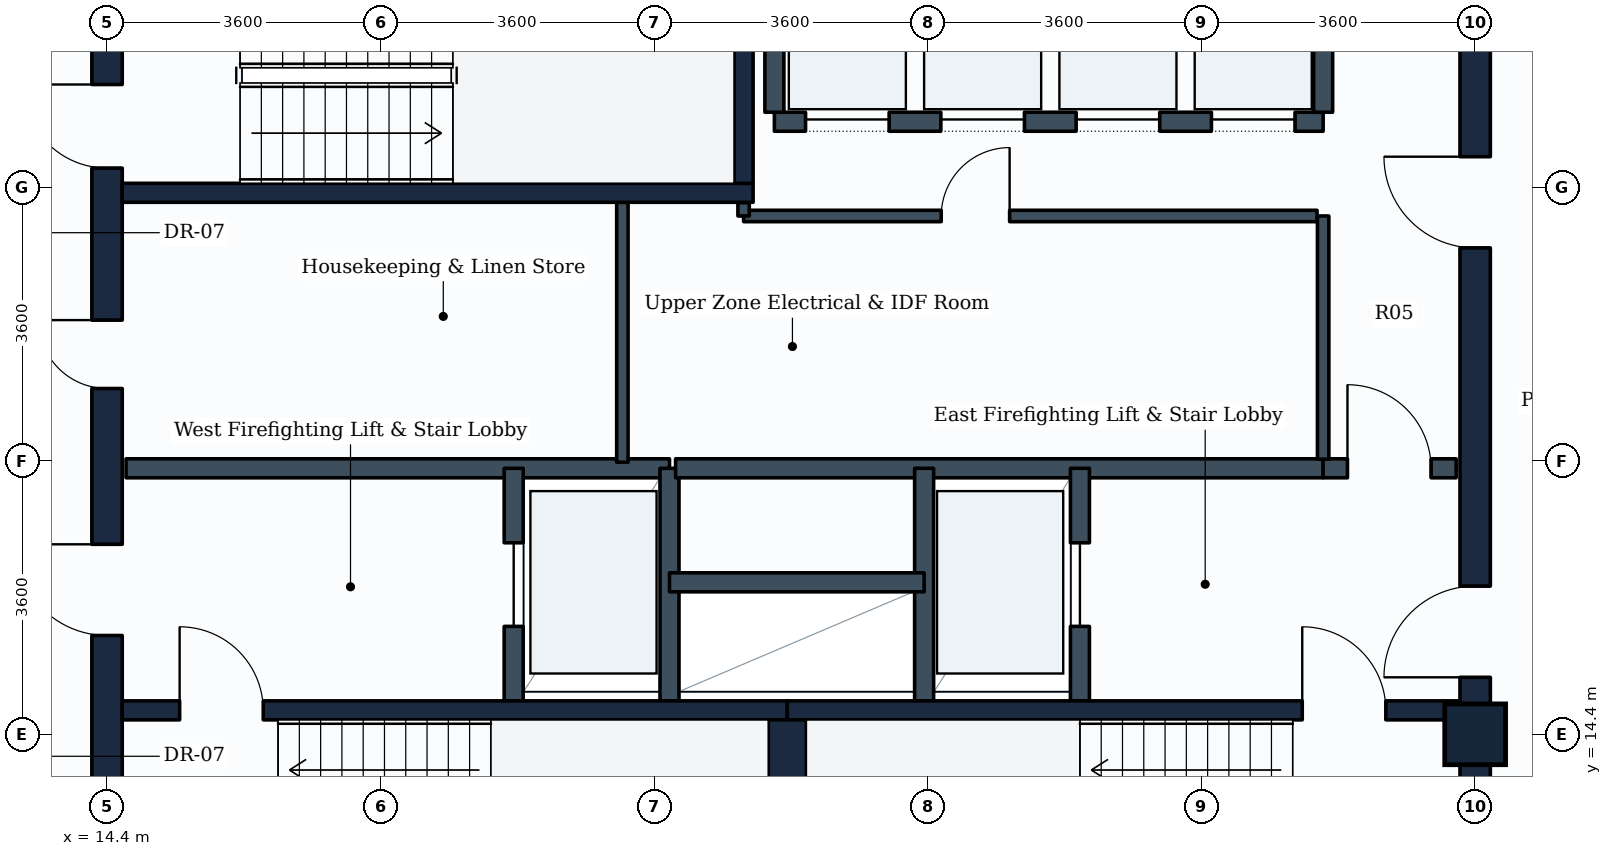
"""IFC4 building model, lengths in metres.
Left out: names, types, materials, properties, quantities, classifications, styles, units other than length and angle.
Written with IfcOpenShell. Run it as: python <this file> out.ifc"""

import sys

from ifc_helpers import new_model, si_unit, direction, frame, frame_2d, origin, origin_2d, place, context, subcontext, project, spatial, rectangle, extrude, element, fill, save


model = new_model("IFC4")
c1 = context("Model", 3, precision=1e-05, world=origin(), true_north=direction((0.0, 1.0)))
c2 = subcontext(c1, "Body", "Model", "MODEL_VIEW")
j1 = project(units=[si_unit("LENGTHUNIT", "METRE"), si_unit("PLANEANGLEUNIT", "RADIAN")], contexts=[c1])
p1 = place(None, origin())
s1 = spatial("IfcSite", under=j1, at=p1, CompositionType="ELEMENT")
p2 = place(p1, origin())
s2 = spatial("IfcBuilding", under=s1, at=p2, CompositionType="ELEMENT")
p3 = place(p2, frame((0.0, 0.0, 224.6)))
s3 = spatial("IfcBuildingStorey", under=s2, at=p3, CompositionType="ELEMENT", Elevation=224.6)
p4 = place(p3, frame((32.4, 14.4, 0.0), z_axis=(0.0, 0.0, 1.0), x_axis=(1.0, 0.0, 0.0)))
e1 = element("IfcColumn", 1, at=p4, inside=s3, PredefinedType="COLUMN", context=c2, shape_type="SweptSolid", body=[
    extrude(rectangle(XDim=0.8, YDim=0.8, at=origin_2d()), origin(), (0.0, 0.0, 1.0), 3.6),
])
p5 = place(p3, frame((14.4, 10.8, 0.0), z_axis=(0.0, 0.0, 1.0), x_axis=(0.0, 1.0, 0.0)))
e2 = element("IfcWall", 2, at=p5, inside=s3, PredefinedType="SHEAR", context=c2, shape_type="SweptSolid", body=[
    extrude(rectangle(XDim=14.4, YDim=0.4, at=frame_2d((7.2, 0.0))), origin(), (0.0, 0.0, 1.0), 3.35),
])
p6 = place(p5, frame((11.05, 0.0, 0.0)))
e3 = element("IfcOpeningElement", 3, at=p6, cuts=e2, PredefinedType="OPENING", context=c2, shape_type="SweptSolid", body=[
    extrude(rectangle(XDim=1.1, YDim=2.1, at=frame_2d((0.55, 1.05))), frame((0.0, 0.21, 0.0), z_axis=(0.0, -1.0, 0.0), x_axis=(1.0, 0.0, 0.0)), (0.0, 0.0, 1.0), 0.42),
])
p7 = place(p5, frame((4.9, 0.0, 0.0)))
e4 = element("IfcOpeningElement", 4, at=p7, cuts=e2, PredefinedType="OPENING", context=c2, shape_type="SweptSolid", body=[
    extrude(rectangle(XDim=1.2, YDim=2.1, at=frame_2d((0.6, 1.05))), frame((0.0, 0.21, 0.0), z_axis=(0.0, -1.0, 0.0), x_axis=(1.0, 0.0, 0.0)), (0.0, 0.0, 1.0), 0.42),
])
p8 = place(p5, frame((8.15, 0.0, 0.0)))
e5 = element("IfcOpeningElement", 5, at=p8, cuts=e2, PredefinedType="OPENING", context=c2, shape_type="SweptSolid", body=[
    extrude(rectangle(XDim=0.9, YDim=2.1, at=frame_2d((0.45, 1.05))), frame((0.0, 0.21, 0.0), z_axis=(0.0, -1.0, 0.0), x_axis=(1.0, 0.0, 0.0)), (0.0, 0.0, 1.0), 0.42),
])
p9 = place(p3, frame((32.4, 10.8, 0.0), z_axis=(0.0, 0.0, 1.0), x_axis=(0.0, 1.0, 0.0)))
e6 = element("IfcWall", 6, at=p9, inside=s3, PredefinedType="SHEAR", context=c2, shape_type="SweptSolid", body=[
    extrude(rectangle(XDim=14.4, YDim=0.4, at=frame_2d((7.2, 0.0))), origin(), (0.0, 0.0, 1.0), 3.35),
])
p10 = place(p9, frame((4.35, 0.0, 0.0)))
e7 = element("IfcOpeningElement", 7, at=p10, cuts=e6, PredefinedType="OPENING", context=c2, shape_type="SweptSolid", body=[
    extrude(rectangle(XDim=1.2, YDim=2.1, at=frame_2d((0.6, 1.05))), frame((0.0, 0.21, 0.0), z_axis=(0.0, -1.0, 0.0), x_axis=(1.0, 0.0, 0.0)), (0.0, 0.0, 1.0), 0.42),
])
p11 = place(p9, frame((10.0, 0.0, 0.0)))
e8 = element("IfcOpeningElement", 8, at=p11, cuts=e6, PredefinedType="OPENING", context=c2, shape_type="SweptSolid", body=[
    extrude(rectangle(XDim=1.2, YDim=2.1, at=frame_2d((0.6, 1.05))), frame((0.0, 0.21, 0.0), z_axis=(0.0, -1.0, 0.0), x_axis=(1.0, 0.0, 0.0)), (0.0, 0.0, 1.0), 0.42),
])
p12 = place(p3, frame((14.6, 14.715, 0.0), z_axis=(0.0, 0.0, 1.0), x_axis=(1.0, 0.0, 0.0)))
e9 = element("IfcWall", 9, at=p12, inside=s3, PredefinedType="SHEAR", context=c2, shape_type="SweptSolid", body=[
    extrude(rectangle(XDim=8.75, YDim=0.25, at=frame_2d((4.375, 0.0))), origin(), (0.0, 0.0, 1.0), 3.35),
])
p13 = place(p12, frame((0.755, 0.0, 0.0)))
e10 = element("IfcOpeningElement", 10, at=p13, cuts=e9, PredefinedType="OPENING", context=c2, shape_type="SweptSolid", body=[
    extrude(rectangle(XDim=1.1, YDim=2.1, at=frame_2d((0.55, 1.05))), frame((0.0, 0.135, 0.0), z_axis=(0.0, -1.0, 0.0), x_axis=(1.0, 0.0, 0.0)), (0.0, 0.0, 1.0), 0.27),
])
p14 = place(p3, frame((23.35, 14.715, 0.0), z_axis=(0.0, 0.0, 1.0), x_axis=(1.0, 0.0, 0.0)))
e11 = element("IfcWall", 11, at=p14, inside=s3, PredefinedType="SHEAR", context=c2, shape_type="SweptSolid", body=[
    extrude(rectangle(XDim=8.85, YDim=0.25, at=frame_2d((4.425, 0.0))), origin(), (0.0, 0.0, 1.0), 3.35),
])
p15 = place(p14, frame((6.775, 0.0, 0.0)))
e12 = element("IfcOpeningElement", 12, at=p15, cuts=e11, PredefinedType="OPENING", context=c2, shape_type="SweptSolid", body=[
    extrude(rectangle(XDim=1.1, YDim=2.1, at=frame_2d((0.55, 1.05))), frame((0.0, 0.135, 0.0), z_axis=(0.0, -1.0, 0.0), x_axis=(1.0, 0.0, 0.0)), (0.0, 0.0, 1.0), 0.27),
])
p16 = place(p3, frame((23.35, 11.75, 0.0), z_axis=(0.0, 0.0, 1.0), x_axis=(0.0, 1.0, 0.0)))
e13 = element("IfcWall", 13, at=p16, inside=s3, PredefinedType="SHEAR", context=c2, shape_type="SweptSolid", body=[
    extrude(rectangle(XDim=2.84, YDim=0.5, at=frame_2d((1.42, 0.0))), origin(), (0.0, 0.0, 1.0), 3.35),
])
p17 = place(p3, frame((14.6, 21.525, 0.0), z_axis=(0.0, 0.0, 1.0), x_axis=(1.0, 0.0, 0.0)))
e14 = element("IfcWall", 14, at=p17, inside=s3, PredefinedType="SHEAR", context=c2, shape_type="SweptSolid", body=[
    extrude(rectangle(XDim=8.3, YDim=0.25, at=frame_2d((4.15, 0.0))), origin(), (0.0, 0.0, 1.0), 3.35),
])
p18 = place(p3, frame((22.775, 21.65, 0.0), z_axis=(0.0, 0.0, 1.0), x_axis=(0.0, 1.0, 0.0)))
e15 = element("IfcWall", 15, at=p18, inside=s3, PredefinedType="SHEAR", context=c2, shape_type="SweptSolid", body=[
    extrude(rectangle(XDim=2.84, YDim=0.25, at=frame_2d((1.42, 0.0))), origin(), (0.0, 0.0, 1.0), 3.35),
])
p19 = place(p3, frame((14.65, 17.9, 0.0), z_axis=(0.0, 0.0, 1.0), x_axis=(1.0, 0.0, 0.0)))
e16 = element("IfcWall", 16, at=p19, inside=s3, PredefinedType="PARTITIONING", context=c2, shape_type="SweptSolid", body=[
    extrude(rectangle(XDim=7.15, YDim=0.25, at=frame_2d((3.575, 0.0))), origin(), (0.0, 0.0, 1.0), 3.335),
])
p20 = place(p3, frame((19.75, 14.84, 0.0), z_axis=(0.0, 0.0, 1.0), x_axis=(0.0, 1.0, 0.0)))
e17 = element("IfcWall", 17, at=p20, inside=s3, PredefinedType="PARTITIONING", context=c2, shape_type="SweptSolid", body=[
    extrude(rectangle(XDim=3.06, YDim=0.25, at=frame_2d((1.53, 0.0))), origin(), (0.0, 0.0, 1.0), 3.335),
])
p21 = place(p20, frame((0.98, 0.0, 0.0)))
e18 = element("IfcOpeningElement", 18, at=p21, cuts=e17, PredefinedType="OPENING", context=c2, shape_type="SweptSolid", body=[
    extrude(rectangle(XDim=1.1, YDim=2.1, at=frame_2d((0.55, 1.05))), frame((0.0, 0.135, 0.0), z_axis=(0.0, -1.0, 0.0), x_axis=(1.0, 0.0, 0.0)), (0.0, 0.0, 1.0), 0.27),
])
p22 = place(p3, frame((21.8, 14.84, 0.0), z_axis=(0.0, 0.0, 1.0), x_axis=(0.0, 1.0, 0.0)))
e19 = element("IfcWall", 19, at=p22, inside=s3, PredefinedType="PARTITIONING", context=c2, shape_type="SweptSolid", body=[
    extrude(rectangle(XDim=3.06, YDim=0.25, at=frame_2d((1.53, 0.0))), origin(), (0.0, 0.0, 1.0), 3.335),
])
p23 = place(p3, frame((21.88, 17.9, 0.0), z_axis=(0.0, 0.0, 1.0), x_axis=(1.0, 0.0, 0.0)))
e20 = element("IfcWall", 20, at=p23, inside=s3, PredefinedType="PARTITIONING", context=c2, shape_type="SweptSolid", body=[
    extrude(rectangle(XDim=8.52, YDim=0.25, at=frame_2d((4.26, 0.0))), origin(), (0.0, 0.0, 1.0), 3.335),
])
p24 = place(p3, frame((30.4, 17.9, 0.0), z_axis=(0.0, 0.0, 1.0), x_axis=(1.0, 0.0, 0.0)))
e21 = element("IfcWall", 21, at=p24, inside=s3, PredefinedType="PARTITIONING", context=c2, shape_type="SweptSolid", body=[
    extrude(rectangle(XDim=1.75, YDim=0.25, at=frame_2d((0.875, 0.0))), origin(), (0.0, 0.0, 1.0), 3.335),
])
p25 = place(p24, frame((0.32, 0.0, 0.0)))
e22 = element("IfcOpeningElement", 22, at=p25, cuts=e21, PredefinedType="OPENING", context=c2, shape_type="SweptSolid", body=[
    extrude(rectangle(XDim=1.1, YDim=2.1, at=frame_2d((0.55, 1.05))), frame((0.0, 0.135, 0.0), z_axis=(0.0, -1.0, 0.0), x_axis=(1.0, 0.0, 0.0)), (0.0, 0.0, 1.0), 0.27),
])
p26 = place(p3, frame((25.15, 14.84, 0.0), z_axis=(0.0, 0.0, 1.0), x_axis=(0.0, 1.0, 0.0)))
e23 = element("IfcWall", 23, at=p26, inside=s3, PredefinedType="PARTITIONING", context=c2, shape_type="SweptSolid", body=[
    extrude(rectangle(XDim=3.06, YDim=0.25, at=frame_2d((1.53, 0.0))), origin(), (0.0, 0.0, 1.0), 3.335),
])
p27 = place(p3, frame((27.2, 14.84, 0.0), z_axis=(0.0, 0.0, 1.0), x_axis=(0.0, 1.0, 0.0)))
e24 = element("IfcWall", 24, at=p27, inside=s3, PredefinedType="PARTITIONING", context=c2, shape_type="SweptSolid", body=[
    extrude(rectangle(XDim=3.06, YDim=0.25, at=frame_2d((1.53, 0.0))), origin(), (0.0, 0.0, 1.0), 3.335),
])
p28 = place(p27, frame((0.98, 0.0, 0.0)))
e25 = element("IfcOpeningElement", 25, at=p28, cuts=e24, PredefinedType="OPENING", context=c2, shape_type="SweptSolid", body=[
    extrude(rectangle(XDim=1.1, YDim=2.1, at=frame_2d((0.55, 1.05))), frame((0.0, 0.135, 0.0), z_axis=(0.0, -1.0, 0.0), x_axis=(1.0, 0.0, 0.0)), (0.0, 0.0, 1.0), 0.27),
])
p29 = place(p3, frame((21.8, 16.4, 0.0), z_axis=(0.0, 0.0, 1.0), x_axis=(1.0, 0.0, 0.0)))
e26 = element("IfcWall", 26, at=p29, inside=s3, PredefinedType="PARTITIONING", context=c2, shape_type="SweptSolid", body=[
    extrude(rectangle(XDim=3.35, YDim=0.25, at=frame_2d((1.675, 0.0))), origin(), (0.0, 0.0, 1.0), 3.335),
])
p30 = place(p3, frame((23.18, 22.46, 0.0), z_axis=(0.0, 0.0, 1.0), x_axis=(1.0, 0.0, 0.0)))
e27 = element("IfcWall", 27, at=p30, inside=s3, PredefinedType="PARTITIONING", context=c2, shape_type="SweptSolid", body=[
    extrude(rectangle(XDim=7.22, YDim=0.25, at=frame_2d((3.61, 0.0))), origin(), (0.0, 0.0, 1.0), 3.335),
])
p31 = place(p30, frame((0.41, 0.0, 0.0)))
e28 = element("IfcOpeningElement", 28, at=p31, cuts=e27, PredefinedType="OPENING", context=c2, shape_type="SweptSolid", body=[
    extrude(rectangle(XDim=1.1, YDim=2.1, at=frame_2d((0.55, 1.05))), frame((0.0, 0.135, 0.0), z_axis=(0.0, -1.0, 0.0), x_axis=(1.0, 0.0, 0.0)), (0.0, 0.0, 1.0), 0.27),
])
p32 = place(p30, frame((2.19, 0.0, 0.0)))
e29 = element("IfcOpeningElement", 29, at=p32, cuts=e27, PredefinedType="OPENING", context=c2, shape_type="SweptSolid", body=[
    extrude(rectangle(XDim=1.1, YDim=2.1, at=frame_2d((0.55, 1.05))), frame((0.0, 0.135, 0.0), z_axis=(0.0, -1.0, 0.0), x_axis=(1.0, 0.0, 0.0)), (0.0, 0.0, 1.0), 0.27),
])
p33 = place(p30, frame((3.97, 0.0, 0.0)))
e30 = element("IfcOpeningElement", 30, at=p33, cuts=e27, PredefinedType="OPENING", context=c2, shape_type="SweptSolid", body=[
    extrude(rectangle(XDim=1.1, YDim=2.1, at=frame_2d((0.55, 1.05))), frame((0.0, 0.135, 0.0), z_axis=(0.0, -1.0, 0.0), x_axis=(1.0, 0.0, 0.0)), (0.0, 0.0, 1.0), 0.27),
])
p34 = place(p30, frame((5.75, 0.0, 0.0)))
e31 = element("IfcOpeningElement", 31, at=p34, cuts=e27, PredefinedType="OPENING", context=c2, shape_type="SweptSolid", body=[
    extrude(rectangle(XDim=1.1, YDim=2.1, at=frame_2d((0.55, 1.05))), frame((0.0, 0.135, 0.0), z_axis=(0.0, -1.0, 0.0), x_axis=(1.0, 0.0, 0.0)), (0.0, 0.0, 1.0), 0.27),
])
for number, where, z_axis, x_axis in (
    (32, (23.18, 22.585, 0.0), (0.0, 0.0, 1.0), (0.0, 1.0, 0.0)),
    (33, (30.4, 22.585, 0.0), (0.0, 0.0, 1.0), (0.0, 1.0, 0.0)),
):
    element("IfcWall", number, at=place(p3, frame(where, z_axis=z_axis, x_axis=x_axis)), inside=s3, PredefinedType="PARTITIONING", context=c2, shape_type="SweptSolid", body=[
        extrude(rectangle(XDim=2.315, YDim=0.25, at=frame_2d((1.157, 0.0))), origin(), (0.0, 0.0, 1.0), 3.335),
    ])
p35 = place(p3, frame((22.775, 21.22, 0.0), z_axis=(0.0, 0.0, 1.0), x_axis=(1.0, 0.0, 0.0)))
e34 = element("IfcWall", 34, at=p35, inside=s3, PredefinedType="PARTITIONING", context=c2, shape_type="SweptSolid", body=[
    extrude(rectangle(XDim=7.545, YDim=0.15, at=frame_2d((3.772, 0.0))), origin(), (0.0, 0.0, 1.0), 3.335),
])
p36 = place(p35, frame((2.6, 0.0, 0.0)))
e35 = element("IfcOpeningElement", 35, at=p36, cuts=e34, PredefinedType="OPENING", context=c2, shape_type="SweptSolid", body=[
    extrude(rectangle(XDim=0.9, YDim=2.1, at=frame_2d((0.45, 1.05))), frame((0.0, 0.085, 0.0), z_axis=(0.0, -1.0, 0.0), x_axis=(1.0, 0.0, 0.0)), (0.0, 0.0, 1.0), 0.17),
])
p37 = place(p3, frame((22.775, 21.22, 0.0), z_axis=(0.0, 0.0, 1.0), x_axis=(0.0, 1.0, 0.0)))
e36 = element("IfcWall", 36, at=p37, inside=s3, PredefinedType="PARTITIONING", context=c2, shape_type="SweptSolid", body=[
    extrude(rectangle(XDim=0.175, YDim=0.15, at=frame_2d((0.087, 0.0))), origin(), (0.0, 0.0, 1.0), 3.335),
])
p38 = place(p3, frame((30.4, 18.02, 0.0), z_axis=(0.0, 0.0, 1.0), x_axis=(0.0, 1.0, 0.0)))
e37 = element("IfcWall", 37, at=p38, inside=s3, PredefinedType="PARTITIONING", context=c2, shape_type="SweptSolid", body=[
    extrude(rectangle(XDim=3.2, YDim=0.15, at=frame_2d((1.6, 0.0))), origin(), (0.0, 0.0, 1.0), 3.335),
])
p39 = place(p3, frame((21.18, 17.98, 0.0), z_axis=(0.0, 0.0, 1.0), x_axis=(0.0, 1.0, 0.0)))
e38 = element("IfcWall", 38, at=p39, inside=s3, PredefinedType="PARTITIONING", context=c2, shape_type="SweptSolid", body=[
    extrude(rectangle(XDim=3.42, YDim=0.15, at=frame_2d((1.71, 0.0))), origin(), (0.0, 0.0, 1.0), 3.335),
])
p40 = place(p13, origin())
e39 = element("IfcDoor", 39, at=p40, inside=s3, OperationType="SINGLE_SWING_LEFT", PredefinedType="DOOR", context=c2, shape_type="SweptSolid", body=[
    extrude(rectangle(XDim=1.1, YDim=2.1, at=frame_2d((0.55, 1.05))), frame((0.0, 0.025, 0.0), z_axis=(0.0, -1.0, 0.0), x_axis=(1.0, 0.0, 0.0)), (0.0, 0.0, 1.0), 0.05),
])
fill(e10, e39)
p41 = place(p15, origin())
e40 = element("IfcDoor", 40, at=p41, inside=s3, OperationType="SINGLE_SWING_LEFT", PredefinedType="DOOR", context=c2, shape_type="SweptSolid", body=[
    extrude(rectangle(XDim=1.1, YDim=2.1, at=frame_2d((0.55, 1.05))), frame((0.0, 0.025, 0.0), z_axis=(0.0, -1.0, 0.0), x_axis=(1.0, 0.0, 0.0)), (0.0, 0.0, 1.0), 0.05),
])
fill(e12, e40)
p42 = place(p6, origin())
e41 = element("IfcDoor", 41, at=p42, inside=s3, OperationType="SINGLE_SWING_RIGHT", PredefinedType="DOOR", context=c2, shape_type="SweptSolid", body=[
    extrude(rectangle(XDim=1.1, YDim=2.1, at=frame_2d((0.55, 1.05))), frame((0.0, 0.025, 0.0), z_axis=(0.0, -1.0, 0.0), x_axis=(1.0, 0.0, 0.0)), (0.0, 0.0, 1.0), 0.05),
])
fill(e3, e41)
p43 = place(p21, origin())
e42 = element("IfcDoor", 42, at=p43, inside=s3, OperationType="SLIDING_TO_LEFT", PredefinedType="DOOR", context=c2, shape_type="SweptSolid", body=[
    extrude(rectangle(XDim=1.1, YDim=2.1, at=frame_2d((0.55, 1.05))), frame((0.0, 0.025, 0.0), z_axis=(0.0, -1.0, 0.0), x_axis=(1.0, 0.0, 0.0)), (0.0, 0.0, 1.0), 0.05),
])
fill(e18, e42)
p44 = place(p28, origin())
e43 = element("IfcDoor", 43, at=p44, inside=s3, OperationType="SLIDING_TO_LEFT", PredefinedType="DOOR", context=c2, shape_type="SweptSolid", body=[
    extrude(rectangle(XDim=1.1, YDim=2.1, at=frame_2d((0.55, 1.05))), frame((0.0, 0.025, 0.0), z_axis=(0.0, -1.0, 0.0), x_axis=(1.0, 0.0, 0.0)), (0.0, 0.0, 1.0), 0.05),
])
fill(e25, e43)
p45 = place(p7, origin())
e44 = element("IfcDoor", 44, at=p45, inside=s3, OperationType="SINGLE_SWING_RIGHT", PredefinedType="DOOR", context=c2, shape_type="SweptSolid", body=[
    extrude(rectangle(XDim=1.2, YDim=2.1, at=frame_2d((0.6, 1.05))), frame((0.0, 0.025, 0.0), z_axis=(0.0, -1.0, 0.0), x_axis=(1.0, 0.0, 0.0)), (0.0, 0.0, 1.0), 0.05),
])
fill(e4, e44)
p46 = place(p10, origin())
e45 = element("IfcDoor", 45, at=p46, inside=s3, OperationType="SINGLE_SWING_LEFT", PredefinedType="DOOR", context=c2, shape_type="SweptSolid", body=[
    extrude(rectangle(XDim=1.2, YDim=2.1, at=frame_2d((0.6, 1.05))), frame((0.0, 0.025, 0.0), z_axis=(0.0, -1.0, 0.0), x_axis=(1.0, 0.0, 0.0)), (0.0, 0.0, 1.0), 0.05),
])
fill(e7, e45)
p47 = place(p25, origin())
e46 = element("IfcDoor", 46, at=p47, inside=s3, OperationType="SINGLE_SWING_LEFT", PredefinedType="DOOR", context=c2, shape_type="SweptSolid", body=[
    extrude(rectangle(XDim=1.1, YDim=2.1, at=frame_2d((0.55, 1.05))), frame((0.0, 0.025, 0.0), z_axis=(0.0, -1.0, 0.0), x_axis=(1.0, 0.0, 0.0)), (0.0, 0.0, 1.0), 0.05),
])
fill(e22, e46)
p48 = place(p31, origin())
e47 = element("IfcDoor", 47, at=p48, inside=s3, OperationType="SLIDING_TO_LEFT", PredefinedType="DOOR", context=c2, shape_type="SweptSolid", body=[
    extrude(rectangle(XDim=1.1, YDim=2.1, at=frame_2d((0.55, 1.05))), frame((0.0, 0.025, 0.0), z_axis=(0.0, -1.0, 0.0), x_axis=(1.0, 0.0, 0.0)), (0.0, 0.0, 1.0), 0.05),
])
fill(e28, e47)
p49 = place(p32, origin())
e48 = element("IfcDoor", 48, at=p49, inside=s3, OperationType="SLIDING_TO_LEFT", PredefinedType="DOOR", context=c2, shape_type="SweptSolid", body=[
    extrude(rectangle(XDim=1.1, YDim=2.1, at=frame_2d((0.55, 1.05))), frame((0.0, 0.025, 0.0), z_axis=(0.0, -1.0, 0.0), x_axis=(1.0, 0.0, 0.0)), (0.0, 0.0, 1.0), 0.05),
])
fill(e29, e48)
p50 = place(p33, origin())
e49 = element("IfcDoor", 49, at=p50, inside=s3, OperationType="SLIDING_TO_LEFT", PredefinedType="DOOR", context=c2, shape_type="SweptSolid", body=[
    extrude(rectangle(XDim=1.1, YDim=2.1, at=frame_2d((0.55, 1.05))), frame((0.0, 0.025, 0.0), z_axis=(0.0, -1.0, 0.0), x_axis=(1.0, 0.0, 0.0)), (0.0, 0.0, 1.0), 0.05),
])
fill(e30, e49)
p51 = place(p34, origin())
e50 = element("IfcDoor", 50, at=p51, inside=s3, OperationType="SLIDING_TO_LEFT", PredefinedType="DOOR", context=c2, shape_type="SweptSolid", body=[
    extrude(rectangle(XDim=1.1, YDim=2.1, at=frame_2d((0.55, 1.05))), frame((0.0, 0.025, 0.0), z_axis=(0.0, -1.0, 0.0), x_axis=(1.0, 0.0, 0.0)), (0.0, 0.0, 1.0), 0.05),
])
fill(e31, e50)
p52 = place(p11, origin())
e51 = element("IfcDoor", 51, at=p52, inside=s3, OperationType="SINGLE_SWING_RIGHT", PredefinedType="DOOR", context=c2, shape_type="SweptSolid", body=[
    extrude(rectangle(XDim=1.2, YDim=2.1, at=frame_2d((0.6, 1.05))), frame((0.0, 0.025, 0.0), z_axis=(0.0, -1.0, 0.0), x_axis=(1.0, 0.0, 0.0)), (0.0, 0.0, 1.0), 0.05),
])
fill(e8, e51)
p53 = place(p8, origin())
e52 = element("IfcDoor", 52, at=p53, inside=s3, OperationType="SINGLE_SWING_RIGHT", PredefinedType="DOOR", context=c2, shape_type="SweptSolid", body=[
    extrude(rectangle(XDim=0.9, YDim=2.1, at=frame_2d((0.45, 1.05))), frame((0.0, 0.025, 0.0), z_axis=(0.0, -1.0, 0.0), x_axis=(1.0, 0.0, 0.0)), (0.0, 0.0, 1.0), 0.05),
])
fill(e5, e52)
p54 = place(p36, origin())
e53 = element("IfcDoor", 53, at=p54, inside=s3, OperationType="SINGLE_SWING_RIGHT", PredefinedType="DOOR", context=c2, shape_type="SweptSolid", body=[
    extrude(rectangle(XDim=0.9, YDim=2.1, at=frame_2d((0.45, 1.05))), frame((0.0, 0.025, 0.0), z_axis=(0.0, -1.0, 0.0), x_axis=(1.0, 0.0, 0.0)), (0.0, 0.0, 1.0), 0.05),
])
fill(e35, e53)
save(model, sys.argv[1])
